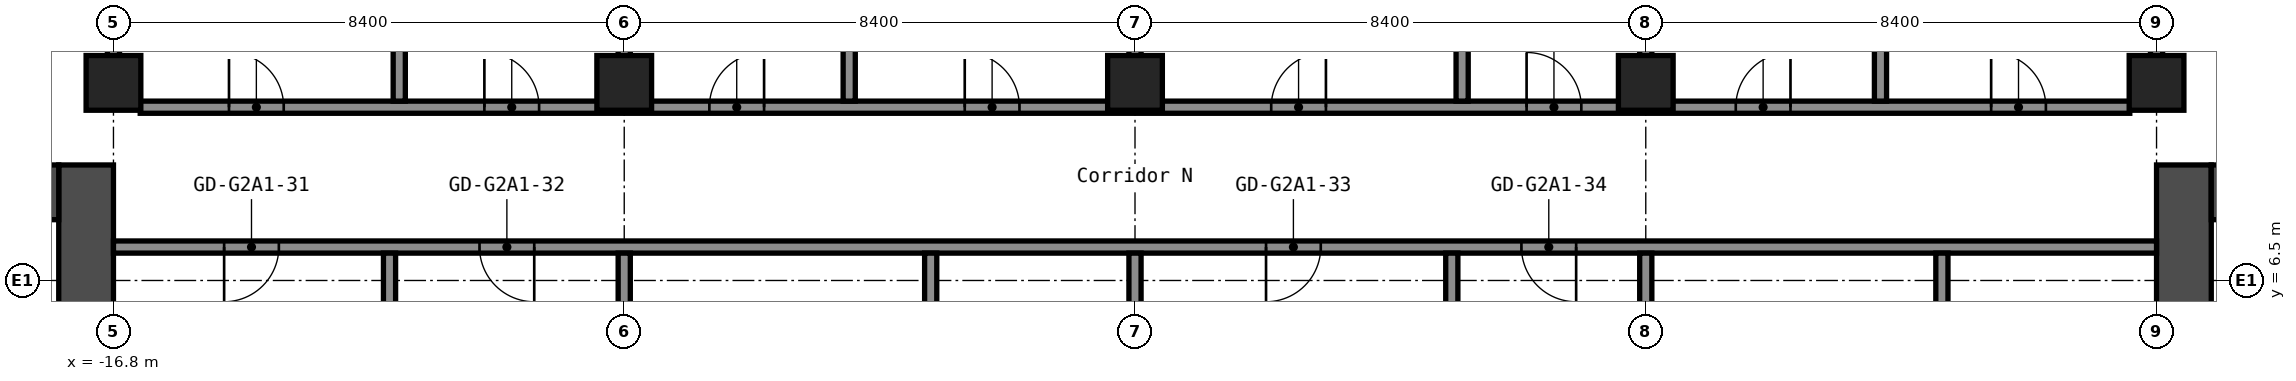
"""IFC4 building model, lengths in metres.
Left out: names, types, materials, properties, quantities, classifications, styles, units other than length and angle.
Written with IfcOpenShell. Run it as: python <this file> out.ifc"""

import sys

from ifc_helpers import new_model, si_unit, direction, frame, frame_2d, origin, origin_2d, place, context, subcontext, project, spatial, rectangle, hollow_rectangle, extrude, element, fill, save


model = new_model("IFC4")
c1 = context("Model", 3, precision=1e-05, world=origin(), true_north=direction((0.0, 1.0)))
c2 = subcontext(c1, "Body", "Model", "MODEL_VIEW")
j1 = project(units=[si_unit("LENGTHUNIT", "METRE"), si_unit("PLANEANGLEUNIT", "RADIAN")], contexts=[c1])
p1 = place(None, origin())
s1 = spatial("IfcSite", under=j1, at=p1, CompositionType="ELEMENT")
p2 = place(p1, origin())
s2 = spatial("IfcBuilding", under=s1, at=p2, CompositionType="ELEMENT")
p3 = place(p2, frame((0.0, 0.0, 91.4)))
s3 = spatial("IfcBuildingStorey", under=s2, at=p3, CompositionType="ELEMENT", Elevation=91.4)
for number, where, z_axis, x_axis in (
    (1, (-16.8, 9.75, 0.0), (0.0, 0.0, 1.0), (1.0, 0.0, 0.0)),
    (2, (-8.4, 9.75, 0.0), (0.0, 0.0, 1.0), (1.0, 0.0, 0.0)),
    (3, (0.0, 9.75, 0.0), (0.0, 0.0, 1.0), (1.0, 0.0, 0.0)),
    (4, (8.4, 9.75, 0.0), (0.0, 0.0, 1.0), (1.0, 0.0, 0.0)),
    (5, (16.8, 9.75, 0.0), (0.0, 0.0, 1.0), (1.0, 0.0, 0.0)),
):
    element("IfcColumn", number, at=place(p3, frame(where, z_axis=z_axis, x_axis=x_axis)), inside=s3, PredefinedType="COLUMN", context=c2, shape_type="SweptSolid", body=[
        extrude(hollow_rectangle(XDim=0.9, YDim=0.9, WallThickness=0.036, at=origin_2d()), origin(), (0.0, 0.0, 1.0), 2.8),
    ])
p4 = place(p3, frame((-17.25, -8.4, 0.0), z_axis=(0.0, 0.0, 1.0), x_axis=(0.0, 1.0, 0.0)))
e6 = element("IfcWall", 6, at=p4, inside=s3, PredefinedType="SHEAR", context=c2, shape_type="SweptSolid", body=[
    extrude(rectangle(XDim=16.8, YDim=0.9, at=frame_2d((8.4, 0.0))), origin(), (0.0, 0.0, 1.0), 2.8),
])
p5 = place(p4, frame((7.6, 0.0, 0.0)))
e7 = element("IfcOpeningElement", 7, at=p5, cuts=e6, PredefinedType="OPENING", context=c2, shape_type="SweptSolid", body=[
    extrude(rectangle(XDim=1.2, YDim=2.1, at=frame_2d((0.6, 1.05))), frame((0.0, 0.46, 0.0), z_axis=(0.0, -1.0, 0.0), x_axis=(1.0, 0.0, 0.0)), (0.0, 0.0, 1.0), 0.92),
])
p6 = place(p3, frame((-32.7, 7.95, 0.0), z_axis=(0.0, 0.0, 1.0), x_axis=(1.0, 0.0, 0.0)))
e8 = element("IfcWall", 8, at=p6, inside=s3, PredefinedType="SHEAR", context=c2, shape_type="SweptSolid", body=[
    extrude(rectangle(XDim=15.0, YDim=0.9, at=frame_2d((7.5, 0.0))), origin(), (0.0, 0.0, 1.0), 2.8),
])
p7 = place(p6, frame((3.4, 0.0, 0.0)))
e9 = element("IfcOpeningElement", 9, at=p7, cuts=e8, PredefinedType="OPENING", context=c2, shape_type="SweptSolid", body=[
    extrude(rectangle(XDim=1.2, YDim=2.1, at=frame_2d((0.6, 1.05))), frame((0.0, 0.46, 0.0), z_axis=(0.0, -1.0, 0.0), x_axis=(1.0, 0.0, 0.0)), (0.0, 0.0, 1.0), 0.92),
])
p8 = place(p6, frame((0.75, 0.0, 0.0)))
e10 = element("IfcOpeningElement", 10, at=p8, cuts=e8, PredefinedType="OPENING", context=c2, shape_type="SweptSolid", body=[
    extrude(rectangle(XDim=0.9, YDim=2.1, at=frame_2d((0.45, 1.05))), frame((0.0, 0.46, 0.0), z_axis=(0.0, -1.0, 0.0), x_axis=(1.0, 0.0, 0.0)), (0.0, 0.0, 1.0), 0.92),
])
p9 = place(p3, frame((17.25, -8.4, 0.0), z_axis=(0.0, 0.0, 1.0), x_axis=(0.0, 1.0, 0.0)))
e11 = element("IfcWall", 11, at=p9, inside=s3, PredefinedType="SHEAR", context=c2, shape_type="SweptSolid", body=[
    extrude(rectangle(XDim=16.8, YDim=0.9, at=frame_2d((8.4, 0.0))), origin(), (0.0, 0.0, 1.0), 2.8),
])
p10 = place(p9, frame((7.6, 0.0, 0.0)))
e12 = element("IfcOpeningElement", 12, at=p10, cuts=e11, PredefinedType="OPENING", context=c2, shape_type="SweptSolid", body=[
    extrude(rectangle(XDim=1.2, YDim=2.1, at=frame_2d((0.6, 1.05))), frame((0.0, 0.46, 0.0), z_axis=(0.0, -1.0, 0.0), x_axis=(1.0, 0.0, 0.0)), (0.0, 0.0, 1.0), 0.92),
])
p11 = place(p3, frame((17.7, 7.95, 0.0), z_axis=(0.0, 0.0, 1.0), x_axis=(1.0, 0.0, 0.0)))
e13 = element("IfcWall", 13, at=p11, inside=s3, PredefinedType="SHEAR", context=c2, shape_type="SweptSolid", body=[
    extrude(rectangle(XDim=15.0, YDim=0.9, at=frame_2d((7.5, 0.0))), origin(), (0.0, 0.0, 1.0), 2.8),
])
p12 = place(p11, frame((10.4, 0.0, 0.0)))
e14 = element("IfcOpeningElement", 14, at=p12, cuts=e13, PredefinedType="OPENING", context=c2, shape_type="SweptSolid", body=[
    extrude(rectangle(XDim=1.2, YDim=2.1, at=frame_2d((0.6, 1.05))), frame((0.0, 0.46, 0.0), z_axis=(0.0, -1.0, 0.0), x_axis=(1.0, 0.0, 0.0)), (0.0, 0.0, 1.0), 0.92),
])
p13 = place(p11, frame((13.35, 0.0, 0.0)))
e15 = element("IfcOpeningElement", 15, at=p13, cuts=e13, PredefinedType="OPENING", context=c2, shape_type="SweptSolid", body=[
    extrude(rectangle(XDim=0.9, YDim=2.1, at=frame_2d((0.45, 1.05))), frame((0.0, 0.46, 0.0), z_axis=(0.0, -1.0, 0.0), x_axis=(1.0, 0.0, 0.0)), (0.0, 0.0, 1.0), 0.92),
])
p14 = place(p3, frame((-16.8, 7.05, 0.0), z_axis=(0.0, 0.0, 1.0), x_axis=(1.0, 0.0, 0.0)))
e16 = element("IfcWall", 16, at=p14, inside=s3, PredefinedType="PARTITIONING", context=c2, shape_type="SweptSolid", body=[
    extrude(rectangle(XDim=33.6, YDim=0.2, at=frame_2d((16.8, 0.0))), origin(), (0.0, 0.0, 1.0), 2.8),
])
p15 = place(p14, frame((1.82, 0.0, 0.0)))
e17 = element("IfcOpeningElement", 17, at=p15, cuts=e16, PredefinedType="OPENING", context=c2, shape_type="SweptSolid", body=[
    extrude(rectangle(XDim=0.9, YDim=2.1, at=frame_2d((0.45, 1.05))), frame((0.0, 0.11, 0.0), z_axis=(0.0, -1.0, 0.0), x_axis=(1.0, 0.0, 0.0)), (0.0, 0.0, 1.0), 0.22),
])
p16 = place(p14, frame((6.02, 0.0, 0.0)))
e18 = element("IfcOpeningElement", 18, at=p16, cuts=e16, PredefinedType="OPENING", context=c2, shape_type="SweptSolid", body=[
    extrude(rectangle(XDim=0.9, YDim=2.1, at=frame_2d((0.45, 1.05))), frame((0.0, 0.11, 0.0), z_axis=(0.0, -1.0, 0.0), x_axis=(1.0, 0.0, 0.0)), (0.0, 0.0, 1.0), 0.22),
])
p17 = place(p14, frame((18.955, 0.0, 0.0)))
e19 = element("IfcOpeningElement", 19, at=p17, cuts=e16, PredefinedType="OPENING", context=c2, shape_type="SweptSolid", body=[
    extrude(rectangle(XDim=0.9, YDim=2.1, at=frame_2d((0.45, 1.05))), frame((0.0, 0.11, 0.0), z_axis=(0.0, -1.0, 0.0), x_axis=(1.0, 0.0, 0.0)), (0.0, 0.0, 1.0), 0.22),
])
p18 = place(p14, frame((23.155, 0.0, 0.0)))
e20 = element("IfcOpeningElement", 20, at=p18, cuts=e16, PredefinedType="OPENING", context=c2, shape_type="SweptSolid", body=[
    extrude(rectangle(XDim=0.9, YDim=2.1, at=frame_2d((0.45, 1.05))), frame((0.0, 0.11, 0.0), z_axis=(0.0, -1.0, 0.0), x_axis=(1.0, 0.0, 0.0)), (0.0, 0.0, 1.0), 0.22),
])
p19 = place(p3, frame((-16.36, 9.35, 0.0), z_axis=(0.0, 0.0, 1.0), x_axis=(1.0, 0.0, 0.0)))
e21 = element("IfcWall", 21, at=p19, inside=s3, PredefinedType="PARTITIONING", context=c2, shape_type="SweptSolid", body=[
    extrude(rectangle(XDim=32.72, YDim=0.2, at=frame_2d((16.36, 0.0))), origin(), (0.0, 0.0, 1.0), 2.8),
])
p20 = place(p19, frame((1.46, 0.0, 0.0)))
e22 = element("IfcOpeningElement", 22, at=p20, cuts=e21, PredefinedType="OPENING", context=c2, shape_type="SweptSolid", body=[
    extrude(rectangle(XDim=0.9, YDim=2.1, at=frame_2d((0.45, 1.05))), frame((0.0, 0.11, 0.0), z_axis=(0.0, -1.0, 0.0), x_axis=(1.0, 0.0, 0.0)), (0.0, 0.0, 1.0), 0.22),
])
p21 = place(p19, frame((5.66, 0.0, 0.0)))
e23 = element("IfcOpeningElement", 23, at=p21, cuts=e21, PredefinedType="OPENING", context=c2, shape_type="SweptSolid", body=[
    extrude(rectangle(XDim=0.9, YDim=2.1, at=frame_2d((0.45, 1.05))), frame((0.0, 0.11, 0.0), z_axis=(0.0, -1.0, 0.0), x_axis=(1.0, 0.0, 0.0)), (0.0, 0.0, 1.0), 0.22),
])
p22 = place(p19, frame((9.36, 0.0, 0.0)))
e24 = element("IfcOpeningElement", 24, at=p22, cuts=e21, PredefinedType="OPENING", context=c2, shape_type="SweptSolid", body=[
    extrude(rectangle(XDim=0.9, YDim=2.1, at=frame_2d((0.45, 1.05))), frame((0.0, 0.11, 0.0), z_axis=(0.0, -1.0, 0.0), x_axis=(1.0, 0.0, 0.0)), (0.0, 0.0, 1.0), 0.22),
])
p23 = place(p19, frame((13.56, 0.0, 0.0)))
e25 = element("IfcOpeningElement", 25, at=p23, cuts=e21, PredefinedType="OPENING", context=c2, shape_type="SweptSolid", body=[
    extrude(rectangle(XDim=0.9, YDim=2.1, at=frame_2d((0.45, 1.05))), frame((0.0, 0.11, 0.0), z_axis=(0.0, -1.0, 0.0), x_axis=(1.0, 0.0, 0.0)), (0.0, 0.0, 1.0), 0.22),
])
p24 = place(p19, frame((18.6, 0.0, 0.0)))
e26 = element("IfcOpeningElement", 26, at=p24, cuts=e21, PredefinedType="OPENING", context=c2, shape_type="SweptSolid", body=[
    extrude(rectangle(XDim=0.9, YDim=2.1, at=frame_2d((0.45, 1.05))), frame((0.0, 0.11, 0.0), z_axis=(0.0, -1.0, 0.0), x_axis=(1.0, 0.0, 0.0)), (0.0, 0.0, 1.0), 0.22),
])
p25 = place(p19, frame((22.8, 0.0, 0.0)))
e27 = element("IfcOpeningElement", 27, at=p25, cuts=e21, PredefinedType="OPENING", context=c2, shape_type="SweptSolid", body=[
    extrude(rectangle(XDim=0.9, YDim=2.1, at=frame_2d((0.45, 1.05))), frame((0.0, 0.11, 0.0), z_axis=(0.0, -1.0, 0.0), x_axis=(1.0, 0.0, 0.0)), (0.0, 0.0, 1.0), 0.22),
])
p26 = place(p19, frame((26.24, 0.0, 0.0)))
e28 = element("IfcOpeningElement", 28, at=p26, cuts=e21, PredefinedType="OPENING", context=c2, shape_type="SweptSolid", body=[
    extrude(rectangle(XDim=0.9, YDim=2.1, at=frame_2d((0.45, 1.05))), frame((0.0, 0.11, 0.0), z_axis=(0.0, -1.0, 0.0), x_axis=(1.0, 0.0, 0.0)), (0.0, 0.0, 1.0), 0.22),
])
p27 = place(p19, frame((30.44, 0.0, 0.0)))
e29 = element("IfcOpeningElement", 29, at=p27, cuts=e21, PredefinedType="OPENING", context=c2, shape_type="SweptSolid", body=[
    extrude(rectangle(XDim=0.9, YDim=2.1, at=frame_2d((0.45, 1.05))), frame((0.0, 0.11, 0.0), z_axis=(0.0, -1.0, 0.0), x_axis=(1.0, 0.0, 0.0)), (0.0, 0.0, 1.0), 0.22),
])
p28 = place(p3, frame((-16.8, 10.19, 0.0), z_axis=(0.0, 0.0, 1.0), x_axis=(0.0, 1.0, 0.0)))
e30 = element("IfcWall", 30, at=p28, inside=s3, PredefinedType="PARTITIONING", context=c2, shape_type="SweptSolid", body=[
    extrude(rectangle(XDim=13.36, YDim=0.2, at=frame_2d((6.68, 0.0))), origin(), (0.0, 0.0, 1.0), 2.8),
])
p29 = place(p3, frame((-12.26, 1.05, 0.0), z_axis=(0.0, 0.0, 1.0), x_axis=(0.0, 1.0, 0.0)))
e31 = element("IfcWall", 31, at=p29, inside=s3, PredefinedType="PARTITIONING", context=c2, shape_type="SweptSolid", body=[
    extrude(rectangle(XDim=5.9, YDim=0.2, at=frame_2d((2.95, 0.0))), origin(), (0.0, 0.0, 1.0), 2.8),
])
p30 = place(p3, frame((-12.1, 9.45, 0.0), z_axis=(0.0, 0.0, 1.0), x_axis=(0.0, 1.0, 0.0)))
e32 = element("IfcWall", 32, at=p30, inside=s3, PredefinedType="PARTITIONING", context=c2, shape_type="SweptSolid", body=[
    extrude(rectangle(XDim=14.1, YDim=0.2, at=frame_2d((7.05, 0.0))), origin(), (0.0, 0.0, 1.0), 2.8),
])
p31 = place(p3, frame((-8.4, 1.05, 0.0), z_axis=(0.0, 0.0, 1.0), x_axis=(0.0, 1.0, 0.0)))
e33 = element("IfcWall", 33, at=p31, inside=s3, PredefinedType="PARTITIONING", context=c2, shape_type="SweptSolid", body=[
    extrude(rectangle(XDim=5.9, YDim=0.2, at=frame_2d((2.95, 0.0))), origin(), (0.0, 0.0, 1.0), 2.8),
])
p32 = place(p3, frame((-8.4, 10.19, 0.0), z_axis=(0.0, 0.0, 1.0), x_axis=(0.0, 1.0, 0.0)))
e34 = element("IfcWall", 34, at=p32, inside=s3, PredefinedType="PARTITIONING", context=c2, shape_type="SweptSolid", body=[
    extrude(rectangle(XDim=13.36, YDim=0.2, at=frame_2d((6.68, 0.0))), origin(), (0.0, 0.0, 1.0), 2.8),
])
p33 = place(p3, frame((-4.7, 9.45, 0.0), z_axis=(0.0, 0.0, 1.0), x_axis=(0.0, 1.0, 0.0)))
e35 = element("IfcWall", 35, at=p33, inside=s3, PredefinedType="PARTITIONING", context=c2, shape_type="SweptSolid", body=[
    extrude(rectangle(XDim=14.1, YDim=0.2, at=frame_2d((7.05, 0.0))), origin(), (0.0, 0.0, 1.0), 2.8),
])
for number, where, z_axis, x_axis in (
    (36, (-3.36, 1.05, 0.0), (0.0, 0.0, 1.0), (0.0, 1.0, 0.0)),
    (37, (0.0, 1.05, 0.0), (0.0, 0.0, 1.0), (0.0, 1.0, 0.0)),
):
    element("IfcWall", number, at=place(p3, frame(where, z_axis=z_axis, x_axis=x_axis)), inside=s3, PredefinedType="PARTITIONING", context=c2, shape_type="SweptSolid", body=[
        extrude(rectangle(XDim=5.9, YDim=0.2, at=frame_2d((2.95, 0.0))), origin(), (0.0, 0.0, 1.0), 2.8),
    ])
p34 = place(p3, frame((0.0, 10.19, 0.0), z_axis=(0.0, 0.0, 1.0), x_axis=(0.0, 1.0, 0.0)))
e38 = element("IfcWall", 38, at=p34, inside=s3, PredefinedType="PARTITIONING", context=c2, shape_type="SweptSolid", body=[
    extrude(rectangle(XDim=13.36, YDim=0.2, at=frame_2d((6.68, 0.0))), origin(), (0.0, 0.0, 1.0), 2.8),
])
p35 = place(p3, frame((5.21, 1.05, 0.0), z_axis=(0.0, 0.0, 1.0), x_axis=(0.0, 1.0, 0.0)))
e39 = element("IfcWall", 39, at=p35, inside=s3, PredefinedType="PARTITIONING", context=c2, shape_type="SweptSolid", body=[
    extrude(rectangle(XDim=5.9, YDim=0.2, at=frame_2d((2.95, 0.0))), origin(), (0.0, 0.0, 1.0), 2.8),
])
p36 = place(p3, frame((5.38, 9.45, 0.0), z_axis=(0.0, 0.0, 1.0), x_axis=(0.0, 1.0, 0.0)))
e40 = element("IfcWall", 40, at=p36, inside=s3, PredefinedType="PARTITIONING", context=c2, shape_type="SweptSolid", body=[
    extrude(rectangle(XDim=14.1, YDim=0.2, at=frame_2d((7.05, 0.0))), origin(), (0.0, 0.0, 1.0), 2.8),
])
p37 = place(p3, frame((8.4, 1.05, 0.0), z_axis=(0.0, 0.0, 1.0), x_axis=(0.0, 1.0, 0.0)))
e41 = element("IfcWall", 41, at=p37, inside=s3, PredefinedType="PARTITIONING", context=c2, shape_type="SweptSolid", body=[
    extrude(rectangle(XDim=5.9, YDim=0.2, at=frame_2d((2.95, 0.0))), origin(), (0.0, 0.0, 1.0), 2.8),
])
p38 = place(p3, frame((8.4, 10.19, 0.0), z_axis=(0.0, 0.0, 1.0), x_axis=(0.0, 1.0, 0.0)))
e42 = element("IfcWall", 42, at=p38, inside=s3, PredefinedType="PARTITIONING", context=c2, shape_type="SweptSolid", body=[
    extrude(rectangle(XDim=13.36, YDim=0.2, at=frame_2d((6.68, 0.0))), origin(), (0.0, 0.0, 1.0), 2.8),
])
p39 = place(p3, frame((12.26, 9.45, 0.0), z_axis=(0.0, 0.0, 1.0), x_axis=(0.0, 1.0, 0.0)))
e43 = element("IfcWall", 43, at=p39, inside=s3, PredefinedType="PARTITIONING", context=c2, shape_type="SweptSolid", body=[
    extrude(rectangle(XDim=14.1, YDim=0.2, at=frame_2d((7.05, 0.0))), origin(), (0.0, 0.0, 1.0), 2.8),
])
p40 = place(p3, frame((13.27, 1.05, 0.0), z_axis=(0.0, 0.0, 1.0), x_axis=(0.0, 1.0, 0.0)))
e44 = element("IfcWall", 44, at=p40, inside=s3, PredefinedType="PARTITIONING", context=c2, shape_type="SweptSolid", body=[
    extrude(rectangle(XDim=5.9, YDim=0.2, at=frame_2d((2.95, 0.0))), origin(), (0.0, 0.0, 1.0), 2.8),
])
p41 = place(p3, frame((16.8, 10.19, 0.0), z_axis=(0.0, 0.0, 1.0), x_axis=(0.0, 1.0, 0.0)))
e45 = element("IfcWall", 45, at=p41, inside=s3, PredefinedType="PARTITIONING", context=c2, shape_type="SweptSolid", body=[
    extrude(rectangle(XDim=13.36, YDim=0.2, at=frame_2d((6.68, 0.0))), origin(), (0.0, 0.0, 1.0), 2.8),
])
p42 = place(p15, origin())
e46 = element("IfcDoor", 46, at=p42, inside=s3, OperationType="SINGLE_SWING_LEFT", PredefinedType="DOOR", context=c2, shape_type="SweptSolid", body=[
    extrude(rectangle(XDim=0.9, YDim=2.1, at=frame_2d((0.45, 1.05))), frame((0.0, 0.025, 0.0), z_axis=(0.0, -1.0, 0.0), x_axis=(1.0, 0.0, 0.0)), (0.0, 0.0, 1.0), 0.05),
])
fill(e17, e46)
p43 = place(p16, origin())
e47 = element("IfcDoor", 47, at=p43, inside=s3, OperationType="SINGLE_SWING_RIGHT", PredefinedType="DOOR", context=c2, shape_type="SweptSolid", body=[
    extrude(rectangle(XDim=0.9, YDim=2.1, at=frame_2d((0.45, 1.05))), frame((0.0, 0.025, 0.0), z_axis=(0.0, -1.0, 0.0), x_axis=(1.0, 0.0, 0.0)), (0.0, 0.0, 1.0), 0.05),
])
fill(e18, e47)
p44 = place(p17, origin())
e48 = element("IfcDoor", 48, at=p44, inside=s3, OperationType="SINGLE_SWING_LEFT", PredefinedType="DOOR", context=c2, shape_type="SweptSolid", body=[
    extrude(rectangle(XDim=0.9, YDim=2.1, at=frame_2d((0.45, 1.05))), frame((0.0, 0.025, 0.0), z_axis=(0.0, -1.0, 0.0), x_axis=(1.0, 0.0, 0.0)), (0.0, 0.0, 1.0), 0.05),
])
fill(e19, e48)
p45 = place(p18, origin())
e49 = element("IfcDoor", 49, at=p45, inside=s3, OperationType="SINGLE_SWING_RIGHT", PredefinedType="DOOR", context=c2, shape_type="SweptSolid", body=[
    extrude(rectangle(XDim=0.9, YDim=2.1, at=frame_2d((0.45, 1.05))), frame((0.0, 0.025, 0.0), z_axis=(0.0, -1.0, 0.0), x_axis=(1.0, 0.0, 0.0)), (0.0, 0.0, 1.0), 0.05),
])
fill(e20, e49)
p46 = place(p20, origin())
e50 = element("IfcDoor", 50, at=p46, inside=s3, OperationType="SINGLE_SWING_RIGHT", PredefinedType="DOOR", context=c2, shape_type="SweptSolid", body=[
    extrude(rectangle(XDim=0.9, YDim=2.1, at=frame_2d((0.45, 1.05))), frame((0.0, 0.025, 0.0), z_axis=(0.0, -1.0, 0.0), x_axis=(1.0, 0.0, 0.0)), (0.0, 0.0, 1.0), 0.05),
])
fill(e22, e50)
p47 = place(p21, origin())
e51 = element("IfcDoor", 51, at=p47, inside=s3, OperationType="SINGLE_SWING_RIGHT", PredefinedType="DOOR", context=c2, shape_type="SweptSolid", body=[
    extrude(rectangle(XDim=0.9, YDim=2.1, at=frame_2d((0.45, 1.05))), frame((0.0, 0.025, 0.0), z_axis=(0.0, -1.0, 0.0), x_axis=(1.0, 0.0, 0.0)), (0.0, 0.0, 1.0), 0.05),
])
fill(e23, e51)
p48 = place(p22, origin())
e52 = element("IfcDoor", 52, at=p48, inside=s3, OperationType="SINGLE_SWING_LEFT", PredefinedType="DOOR", context=c2, shape_type="SweptSolid", body=[
    extrude(rectangle(XDim=0.9, YDim=2.1, at=frame_2d((0.45, 1.05))), frame((0.0, 0.025, 0.0), z_axis=(0.0, -1.0, 0.0), x_axis=(1.0, 0.0, 0.0)), (0.0, 0.0, 1.0), 0.05),
])
fill(e24, e52)
p49 = place(p23, origin())
e53 = element("IfcDoor", 53, at=p49, inside=s3, OperationType="SINGLE_SWING_RIGHT", PredefinedType="DOOR", context=c2, shape_type="SweptSolid", body=[
    extrude(rectangle(XDim=0.9, YDim=2.1, at=frame_2d((0.45, 1.05))), frame((0.0, 0.025, 0.0), z_axis=(0.0, -1.0, 0.0), x_axis=(1.0, 0.0, 0.0)), (0.0, 0.0, 1.0), 0.05),
])
fill(e25, e53)
p50 = place(p24, origin())
e54 = element("IfcDoor", 54, at=p50, inside=s3, OperationType="SINGLE_SWING_LEFT", PredefinedType="DOOR", context=c2, shape_type="SweptSolid", body=[
    extrude(rectangle(XDim=0.9, YDim=2.1, at=frame_2d((0.45, 1.05))), frame((0.0, 0.025, 0.0), z_axis=(0.0, -1.0, 0.0), x_axis=(1.0, 0.0, 0.0)), (0.0, 0.0, 1.0), 0.05),
])
fill(e26, e54)
p51 = place(p25, origin())
e55 = element("IfcDoor", 55, at=p51, inside=s3, OperationType="SINGLE_SWING_RIGHT", PredefinedType="DOOR", context=c2, shape_type="SweptSolid", body=[
    extrude(rectangle(XDim=0.9, YDim=2.1, at=frame_2d((0.45, 1.05))), frame((0.0, 0.025, 0.0), z_axis=(0.0, -1.0, 0.0), x_axis=(1.0, 0.0, 0.0)), (0.0, 0.0, 1.0), 0.05),
])
fill(e27, e55)
p52 = place(p26, origin())
e56 = element("IfcDoor", 56, at=p52, inside=s3, OperationType="SINGLE_SWING_LEFT", PredefinedType="DOOR", context=c2, shape_type="SweptSolid", body=[
    extrude(rectangle(XDim=0.9, YDim=2.1, at=frame_2d((0.45, 1.05))), frame((0.0, 0.025, 0.0), z_axis=(0.0, -1.0, 0.0), x_axis=(1.0, 0.0, 0.0)), (0.0, 0.0, 1.0), 0.05),
])
fill(e28, e56)
p53 = place(p27, origin())
e57 = element("IfcDoor", 57, at=p53, inside=s3, OperationType="SINGLE_SWING_RIGHT", PredefinedType="DOOR", context=c2, shape_type="SweptSolid", body=[
    extrude(rectangle(XDim=0.9, YDim=2.1, at=frame_2d((0.45, 1.05))), frame((0.0, 0.025, 0.0), z_axis=(0.0, -1.0, 0.0), x_axis=(1.0, 0.0, 0.0)), (0.0, 0.0, 1.0), 0.05),
])
fill(e29, e57)
save(model, sys.argv[1])
